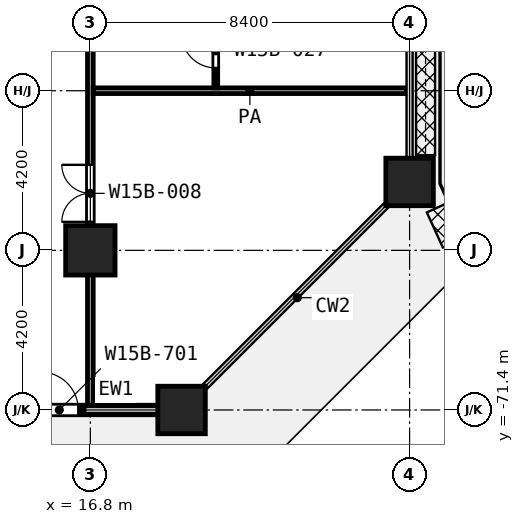
"""IFC4 building model, lengths in metres.
Left out: names, types, materials, properties, quantities, classifications, styles, units other than length and angle.
Written with IfcOpenShell. Run it as: python <this file> out.ifc"""

import sys

from ifc_helpers import new_model, si_unit, direction, frame, frame_2d, origin, origin_2d, place, context, subcontext, project, spatial, rectangle, extrude, element, fill, save


model = new_model("IFC4")
c1 = context("Model", 3, precision=1e-05, world=origin(), true_north=direction((0.0, 1.0)))
c2 = subcontext(c1, "Body", "Model", "MODEL_VIEW")
j1 = project(units=[si_unit("LENGTHUNIT", "METRE"), si_unit("PLANEANGLEUNIT", "RADIAN")], contexts=[c1])
p1 = place(None, origin())
s1 = spatial("IfcSite", under=j1, at=p1, CompositionType="ELEMENT")
p2 = place(p1, origin())
s2 = spatial("IfcBuilding", under=s1, at=p2, CompositionType="ELEMENT")
p3 = place(p2, frame((0.0, 0.0, 85.4)))
s3 = spatial("IfcBuildingStorey", under=s2, at=p3, CompositionType="ELEMENT", Elevation=85.4)
p4 = place(p3, frame((25.2, -65.4, 0.0), z_axis=(0.0, 0.0, 1.0), x_axis=(1.0, 0.0, 0.0)))
e1 = element("IfcColumn", 1, at=p4, inside=s3, PredefinedType="COLUMN", context=c2, shape_type="SweptSolid", body=[
    extrude(rectangle(XDim=1.25, YDim=1.25, at=origin_2d()), origin(), (0.0, 0.0, 1.0), 4.2),
])
p5 = place(p3, frame((16.8, -67.2, 0.0), z_axis=(0.0, 0.0, 1.0), x_axis=(1.0, 0.0, 0.0)))
e2 = element("IfcColumn", 2, at=p5, inside=s3, PredefinedType="COLUMN", context=c2, shape_type="SweptSolid", body=[
    extrude(rectangle(XDim=1.3, YDim=1.3, at=origin_2d()), origin(), (0.0, 0.0, 1.0), 4.2),
])
p6 = place(p3, frame((19.2, -71.4, 0.0), z_axis=(0.0, 0.0, 1.0), x_axis=(1.0, 0.0, 0.0)))
e3 = element("IfcColumn", 3, at=p6, inside=s3, PredefinedType="COLUMN", context=c2, shape_type="SweptSolid", body=[
    extrude(rectangle(XDim=1.25, YDim=1.25, at=origin_2d()), origin(), (0.0, 0.0, 1.0), 4.2),
])
p7 = place(p3, frame((14.592, -71.4, 0.0), z_axis=(0.0, 0.0, 1.0), x_axis=(1.0, 0.0, 0.0)))
e4 = element("IfcWall", 4, at=p7, inside=s3, PredefinedType="SOLIDWALL", context=c2, shape_type="SweptSolid", body=[
    extrude(rectangle(XDim=3.983, YDim=0.25, at=frame_2d((1.992, 0.0))), origin(), (0.0, 0.0, 1.0), 3.78),
])
p8 = place(p7, frame((0.892, 0.0, 0.0)))
e5 = element("IfcOpeningElement", 5, at=p8, cuts=e4, PredefinedType="OPENING", context=c2, shape_type="SweptSolid", body=[
    extrude(rectangle(XDim=1.0, YDim=2.1, at=frame_2d((0.5, 1.05))), frame((0.0, 0.135, 0.0), z_axis=(0.0, -1.0, 0.0), x_axis=(1.0, 0.0, 0.0)), (0.0, 0.0, 1.0), 0.27),
])
p9 = place(p3, frame((20.1, -62.925, 0.0), z_axis=(0.0, 0.0, 1.0), x_axis=(0.0, 1.0, 0.0)))
e6 = element("IfcWall", 6, at=p9, inside=s3, PredefinedType="PARTITIONING", context=c2, shape_type="SweptSolid", body=[
    extrude(rectangle(XDim=2.025, YDim=0.1, at=frame_2d((1.013, 0.0))), origin(), (0.0, 0.0, 1.0), 3.9),
])
p10 = place(p9, frame((0.525, 0.0, 0.0)))
e7 = element("IfcOpeningElement", 7, at=p10, cuts=e6, PredefinedType="OPENING", context=c2, shape_type="SweptSolid", body=[
    extrude(rectangle(XDim=0.9, YDim=2.1, at=frame_2d((0.45, 1.05))), frame((0.0, 0.06, 0.0), z_axis=(0.0, -1.0, 0.0), x_axis=(1.0, 0.0, 0.0)), (0.0, 0.0, 1.0), 0.12),
])
p11 = place(p3, frame((16.875, -63.0, 0.0), z_axis=(0.0, 0.0, 1.0), x_axis=(1.0, 0.0, 0.0)))
e8 = element("IfcWall", 8, at=p11, inside=s3, PredefinedType="PARTITIONING", context=c2, shape_type="SweptSolid", body=[
    extrude(rectangle(XDim=8.245, YDim=0.15, at=frame_2d((4.123, 0.0))), origin(), (0.0, 0.0, 1.0), 3.9),
])
p12 = place(p3, frame((16.8, -71.32, 0.0), z_axis=(0.0, 0.0, 1.0), x_axis=(0.0, 1.0, 0.0)))
e9 = element("IfcWall", 9, at=p12, inside=s3, PredefinedType="PARTITIONING", context=c2, shape_type="SweptSolid", body=[
    extrude(rectangle(XDim=20.268, YDim=0.15, at=frame_2d((10.134, 0.0))), origin(), (0.0, 0.0, 1.0), 3.9),
])
p13 = place(p12, frame((17.17, 0.0, 0.0)))
e10 = element("IfcOpeningElement", 10, at=p13, cuts=e9, PredefinedType="OPENING", context=c2, shape_type="SweptSolid", body=[
    extrude(rectangle(XDim=1.2, YDim=2.1, at=frame_2d((0.6, 1.05))), frame((0.0, 0.085, 0.0), z_axis=(0.0, -1.0, 0.0), x_axis=(1.0, 0.0, 0.0)), (0.0, 0.0, 1.0), 0.17),
])
p14 = place(p12, frame((15.62, 0.0, 0.0)))
e11 = element("IfcOpeningElement", 11, at=p14, cuts=e9, PredefinedType="OPENING", context=c2, shape_type="SweptSolid", body=[
    extrude(rectangle(XDim=1.2, YDim=2.1, at=frame_2d((0.6, 1.05))), frame((0.0, 0.085, 0.0), z_axis=(0.0, -1.0, 0.0), x_axis=(1.0, 0.0, 0.0)), (0.0, 0.0, 1.0), 0.17),
])
p15 = place(p12, frame((13.22, 0.0, 0.0)))
e12 = element("IfcOpeningElement", 12, at=p15, cuts=e9, PredefinedType="OPENING", context=c2, shape_type="SweptSolid", body=[
    extrude(rectangle(XDim=1.2, YDim=2.1, at=frame_2d((0.6, 1.05))), frame((0.0, 0.085, 0.0), z_axis=(0.0, -1.0, 0.0), x_axis=(1.0, 0.0, 0.0)), (0.0, 0.0, 1.0), 0.17),
])
p16 = place(p12, frame((10.62, 0.0, 0.0)))
e13 = element("IfcOpeningElement", 13, at=p16, cuts=e9, PredefinedType="OPENING", context=c2, shape_type="SweptSolid", body=[
    extrude(rectangle(XDim=1.2, YDim=2.1, at=frame_2d((0.6, 1.05))), frame((0.0, 0.085, 0.0), z_axis=(0.0, -1.0, 0.0), x_axis=(1.0, 0.0, 0.0)), (0.0, 0.0, 1.0), 0.17),
])
p17 = place(p12, frame((4.87, 0.0, 0.0)))
e14 = element("IfcOpeningElement", 14, at=p17, cuts=e9, PredefinedType="OPENING", context=c2, shape_type="SweptSolid", body=[
    extrude(rectangle(XDim=1.5, YDim=2.1, at=frame_2d((0.75, 1.05))), frame((0.0, 0.085, 0.0), z_axis=(0.0, -1.0, 0.0), x_axis=(1.0, 0.0, 0.0)), (0.0, 0.0, 1.0), 0.17),
])
p18 = place(p8, origin())
e15 = element("IfcDoor", 15, at=p18, inside=s3, OperationType="SINGLE_SWING_LEFT", PredefinedType="DOOR", context=c2, shape_type="SweptSolid", body=[
    extrude(rectangle(XDim=1.0, YDim=2.1, at=frame_2d((0.5, 1.05))), frame((0.0, 0.025, 0.0), z_axis=(0.0, -1.0, 0.0), x_axis=(1.0, 0.0, 0.0)), (0.0, 0.0, 1.0), 0.05),
])
fill(e5, e15)
p19 = place(p10, origin())
e16 = element("IfcDoor", 16, at=p19, inside=s3, OperationType="SINGLE_SWING_RIGHT", PredefinedType="DOOR", context=c2, shape_type="SweptSolid", body=[
    extrude(rectangle(XDim=0.9, YDim=2.1, at=frame_2d((0.45, 1.05))), frame((0.0, 0.025, 0.0), z_axis=(0.0, -1.0, 0.0), x_axis=(1.0, 0.0, 0.0)), (0.0, 0.0, 1.0), 0.05),
])
fill(e7, e16)
p20 = place(p17, origin())
e17 = element("IfcDoor", 17, at=p20, inside=s3, OperationType="DOUBLE_DOOR_SINGLE_SWING", PredefinedType="DOOR", context=c2, shape_type="SweptSolid", body=[
    extrude(rectangle(XDim=1.5, YDim=2.1, at=frame_2d((0.75, 1.05))), frame((0.0, 0.025, 0.0), z_axis=(0.0, -1.0, 0.0), x_axis=(1.0, 0.0, 0.0)), (0.0, 0.0, 1.0), 0.05),
])
fill(e14, e17)
save(model, sys.argv[1])
